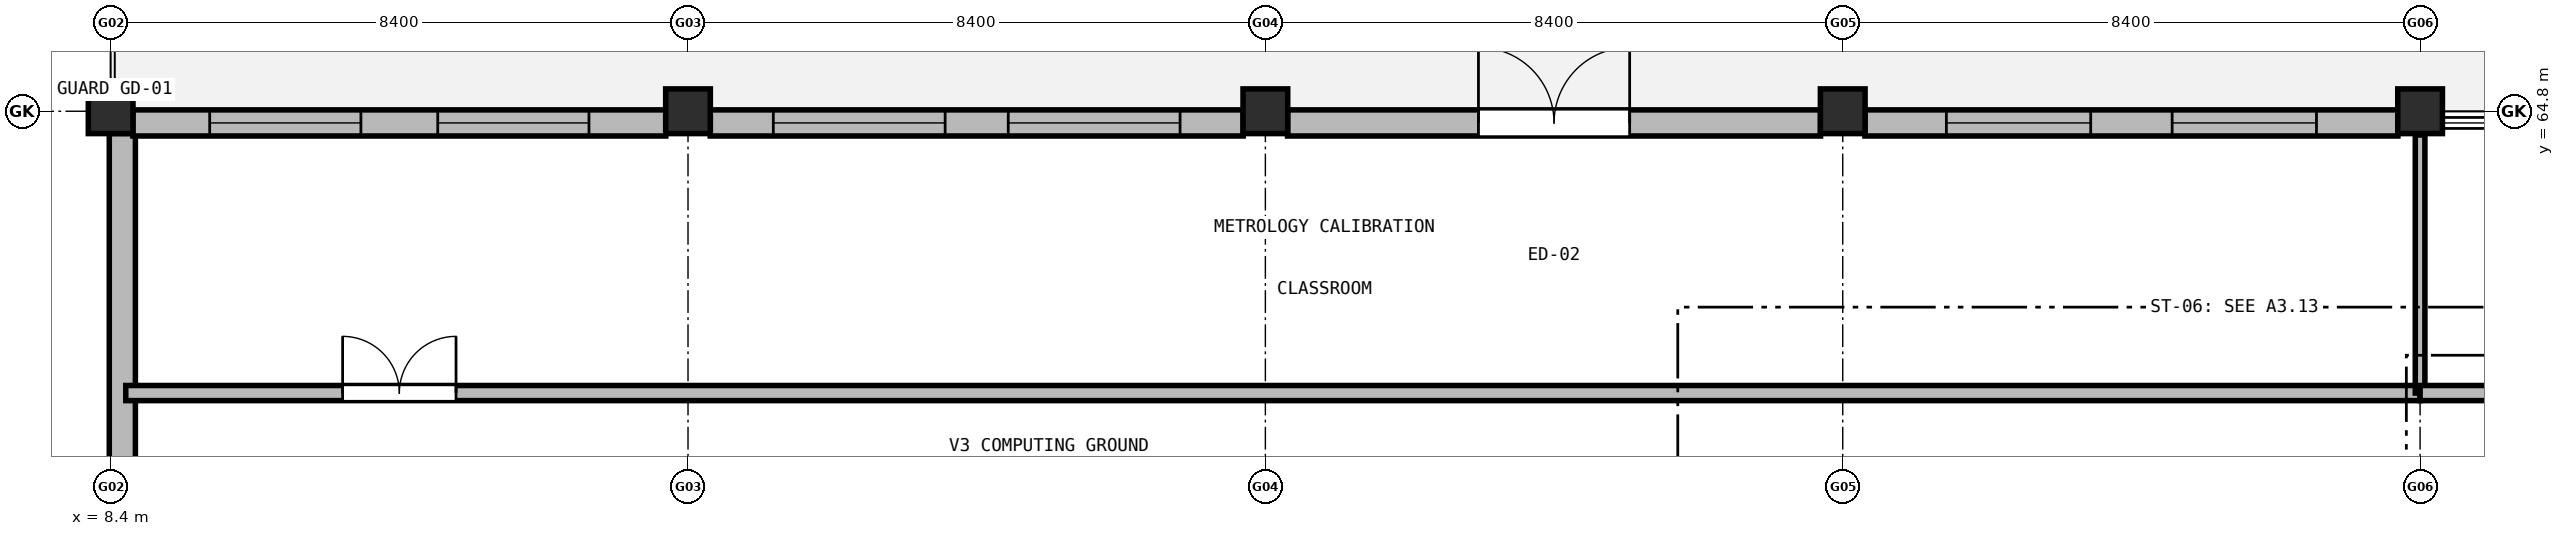
"""IFC4 building model, lengths in metres.
Left out: names, types, materials, properties, quantities, classifications, styles, units other than length and angle.
Written with IfcOpenShell. Run it as: python <this file> out.ifc"""

import sys

from ifc_helpers import new_model, si_unit, direction, frame, frame_2d, origin, origin_2d, place, context, subcontext, project, spatial, rectangle, extrude, element, fill, save


model = new_model("IFC4")
c1 = context("Model", 3, precision=1e-05, world=origin(), true_north=direction((0.0, 1.0)))
c2 = subcontext(c1, "Body", "Model", "MODEL_VIEW")
j1 = project(units=[si_unit("LENGTHUNIT", "METRE"), si_unit("PLANEANGLEUNIT", "RADIAN")], contexts=[c1])
p1 = place(None, origin())
s1 = spatial("IfcSite", under=j1, at=p1, CompositionType="ELEMENT")
p2 = place(p1, origin())
s2 = spatial("IfcBuilding", under=s1, at=p2, CompositionType="ELEMENT")
p3 = place(p2, origin())
s3 = spatial("IfcBuildingStorey", under=s2, at=p3, CompositionType="ELEMENT", Elevation=0.0)
for number, where, z_axis, x_axis in (
    (1, (8.4, 64.8, 0.0), (0.0, 0.0, 1.0), (1.0, 0.0, 0.0)),
    (2, (16.8, 64.8, 0.0), (0.0, 0.0, 1.0), (1.0, 0.0, 0.0)),
    (3, (25.2, 64.8, 0.0), (0.0, 0.0, 1.0), (1.0, 0.0, 0.0)),
    (4, (33.6, 64.8, 0.0), (0.0, 0.0, 1.0), (1.0, 0.0, 0.0)),
    (5, (42.0, 64.8, 0.0), (0.0, 0.0, 1.0), (1.0, 0.0, 0.0)),
):
    element("IfcColumn", number, at=place(p3, frame(where, z_axis=z_axis, x_axis=x_axis)), inside=s3, PredefinedType="COLUMN", context=c2, shape_type="SweptSolid", body=[
        extrude(rectangle(XDim=0.65, YDim=0.65, at=origin_2d()), origin(), (0.0, 0.0, 1.0), 5.1),
    ])
p4 = place(p3, frame((8.57, 57.923, 0.0), z_axis=(0.0, 0.0, 1.0), x_axis=(0.0, 1.0, 0.0)))
e6 = element("IfcWall", 6, at=p4, inside=s3, PredefinedType="SOLIDWALL", context=c2, shape_type="SweptSolid", body=[
    extrude(rectangle(XDim=6.554, YDim=0.38, at=frame_2d((3.277, 0.0))), origin(), (0.0, 0.0, 1.0), 4.11),
])
p5 = place(p3, frame((8.723, 64.63, 0.0), z_axis=(0.0, 0.0, 1.0), x_axis=(1.0, 0.0, 0.0)))
e7 = element("IfcWall", 7, at=p5, inside=s3, PredefinedType="SOLIDWALL", context=c2, shape_type="SweptSolid", body=[
    extrude(rectangle(XDim=7.754, YDim=0.38, at=frame_2d((3.877, 0.0))), origin(), (0.0, 0.0, 1.0), 4.01),
])
p6 = place(p5, frame((1.118, 0.0, 0.95)))
e8 = element("IfcOpeningElement", 8, at=p6, cuts=e7, PredefinedType="OPENING", context=c2, shape_type="SweptSolid", body=[
    extrude(rectangle(XDim=2.2, YDim=1.7, at=frame_2d((1.1, 0.85))), frame((0.0, 0.2, 0.0), z_axis=(0.0, -1.0, 0.0), x_axis=(1.0, 0.0, 0.0)), (0.0, 0.0, 1.0), 0.4),
])
p7 = place(p5, frame((4.436, 0.0, 0.95)))
e9 = element("IfcOpeningElement", 9, at=p7, cuts=e7, PredefinedType="OPENING", context=c2, shape_type="SweptSolid", body=[
    extrude(rectangle(XDim=2.2, YDim=1.7, at=frame_2d((1.1, 0.85))), frame((0.0, 0.2, 0.0), z_axis=(0.0, -1.0, 0.0), x_axis=(1.0, 0.0, 0.0)), (0.0, 0.0, 1.0), 0.4),
])
p8 = place(p3, frame((17.123, 64.63, 0.0), z_axis=(0.0, 0.0, 1.0), x_axis=(1.0, 0.0, 0.0)))
e10 = element("IfcWall", 10, at=p8, inside=s3, PredefinedType="SOLIDWALL", context=c2, shape_type="SweptSolid", body=[
    extrude(rectangle(XDim=7.754, YDim=0.38, at=frame_2d((3.877, 0.0))), origin(), (0.0, 0.0, 1.0), 4.01),
])
p9 = place(p8, frame((0.918, 0.0, 0.95)))
e11 = element("IfcOpeningElement", 11, at=p9, cuts=e10, PredefinedType="OPENING", context=c2, shape_type="SweptSolid", body=[
    extrude(rectangle(XDim=2.5, YDim=2.05, at=frame_2d((1.25, 1.025))), frame((0.0, 0.2, 0.0), z_axis=(0.0, -1.0, 0.0), x_axis=(1.0, 0.0, 0.0)), (0.0, 0.0, 1.0), 0.4),
])
p10 = place(p8, frame((4.336, 0.0, 0.95)))
e12 = element("IfcOpeningElement", 12, at=p10, cuts=e10, PredefinedType="OPENING", context=c2, shape_type="SweptSolid", body=[
    extrude(rectangle(XDim=2.5, YDim=2.05, at=frame_2d((1.25, 1.025))), frame((0.0, 0.2, 0.0), z_axis=(0.0, -1.0, 0.0), x_axis=(1.0, 0.0, 0.0)), (0.0, 0.0, 1.0), 0.4),
])
p11 = place(p3, frame((25.523, 64.63, 0.0), z_axis=(0.0, 0.0, 1.0), x_axis=(1.0, 0.0, 0.0)))
e13 = element("IfcWall", 13, at=p11, inside=s3, PredefinedType="SOLIDWALL", context=c2, shape_type="SweptSolid", body=[
    extrude(rectangle(XDim=7.754, YDim=0.38, at=frame_2d((3.877, 0.0))), origin(), (0.0, 0.0, 1.0), 4.01),
])
p12 = place(p11, frame((2.777, 0.0, 0.0)))
e14 = element("IfcOpeningElement", 14, at=p12, cuts=e13, PredefinedType="OPENING", context=c2, shape_type="SweptSolid", body=[
    extrude(rectangle(XDim=2.2, YDim=2.4, at=frame_2d((1.1, 1.2))), frame((0.0, 0.2, 0.0), z_axis=(0.0, -1.0, 0.0), x_axis=(1.0, 0.0, 0.0)), (0.0, 0.0, 1.0), 0.4),
])
p13 = place(p3, frame((33.923, 64.63, 0.0), z_axis=(0.0, 0.0, 1.0), x_axis=(1.0, 0.0, 0.0)))
e15 = element("IfcWall", 15, at=p13, inside=s3, PredefinedType="SOLIDWALL", context=c2, shape_type="SweptSolid", body=[
    extrude(rectangle(XDim=7.754, YDim=0.38, at=frame_2d((3.877, 0.0))), origin(), (0.0, 0.0, 1.0), 4.01),
])
p14 = place(p13, frame((1.185, 0.0, 0.95)))
e16 = element("IfcOpeningElement", 16, at=p14, cuts=e15, PredefinedType="OPENING", context=c2, shape_type="SweptSolid", body=[
    extrude(rectangle(XDim=2.1, YDim=1.85, at=frame_2d((1.05, 0.925))), frame((0.0, 0.2, 0.0), z_axis=(0.0, -1.0, 0.0), x_axis=(1.0, 0.0, 0.0)), (0.0, 0.0, 1.0), 0.4),
])
p15 = place(p13, frame((4.469, 0.0, 0.95)))
e17 = element("IfcOpeningElement", 17, at=p15, cuts=e15, PredefinedType="OPENING", context=c2, shape_type="SweptSolid", body=[
    extrude(rectangle(XDim=2.1, YDim=1.85, at=frame_2d((1.05, 0.925))), frame((0.0, 0.2, 0.0), z_axis=(0.0, -1.0, 0.0), x_axis=(1.0, 0.0, 0.0)), (0.0, 0.0, 1.0), 0.4),
])
p16 = place(p3, frame((8.62, 60.7, 0.0), z_axis=(0.0, 0.0, 1.0), x_axis=(1.0, 0.0, 0.0)))
e18 = element("IfcWall", 18, at=p16, inside=s3, PredefinedType="SOLIDWALL", context=c2, shape_type="SweptSolid", body=[
    extrude(rectangle(XDim=33.38, YDim=0.22, at=frame_2d((16.69, 0.0))), origin(), (0.0, 0.0, 1.0), 4.105),
])
p17 = place(p16, frame((3.155, 0.0, 0.0)))
e19 = element("IfcOpeningElement", 19, at=p17, cuts=e18, PredefinedType="OPENING", context=c2, shape_type="SweptSolid", body=[
    extrude(rectangle(XDim=1.65, YDim=2.2, at=frame_2d((0.825, 1.1))), frame((0.0, 0.12, 0.0), z_axis=(0.0, -1.0, 0.0), x_axis=(1.0, 0.0, 0.0)), (0.0, 0.0, 1.0), 0.24),
])
p18 = place(p3, frame((42.0, 60.7, 0.0), z_axis=(0.0, 0.0, 1.0), x_axis=(0.0, 1.0, 0.0)))
e20 = element("IfcWall", 20, at=p18, inside=s3, PredefinedType="PARTITIONING", context=c2, shape_type="SweptSolid", body=[
    extrude(rectangle(XDim=3.755, YDim=0.14, at=frame_2d((1.877, 0.0))), origin(), (0.0, 0.0, 1.0), 4.005),
])
p19 = place(p3, frame((42.0, 60.7, 0.0), z_axis=(0.0, 0.0, 1.0), x_axis=(1.0, 0.0, 0.0)))
e21 = element("IfcWall", 21, at=p19, inside=s3, PredefinedType="SOLIDWALL", context=c2, shape_type="SweptSolid", body=[
    extrude(rectangle(XDim=42.0, YDim=0.22, at=frame_2d((21.0, 0.0))), origin(), (0.0, 0.0, 1.0), 4.105),
])
p20 = place(p19, frame((3.55, 0.0, 0.0)))
e22 = element("IfcOpeningElement", 22, at=p20, cuts=e21, PredefinedType="OPENING", context=c2, shape_type="SweptSolid", body=[
    extrude(rectangle(XDim=1.3, YDim=2.15, at=frame_2d((0.65, 1.075))), frame((0.0, 0.12, 0.0), z_axis=(0.0, -1.0, 0.0), x_axis=(1.0, 0.0, 0.0)), (0.0, 0.0, 1.0), 0.24),
])
p21 = place(p6, origin())
e23 = element("IfcWindow", 23, at=p21, inside=s3, PartitioningType="SINGLE_PANEL", PredefinedType="WINDOW", context=c2, shape_type="SweptSolid", body=[
    extrude(rectangle(XDim=2.2, YDim=1.7, at=frame_2d((1.1, 0.85))), frame((0.0, 0.03, 0.0), z_axis=(0.0, -1.0, 0.0), x_axis=(1.0, 0.0, 0.0)), (0.0, 0.0, 1.0), 0.06),
])
fill(e8, e23)
p22 = place(p7, origin())
e24 = element("IfcWindow", 24, at=p22, inside=s3, PartitioningType="SINGLE_PANEL", PredefinedType="WINDOW", context=c2, shape_type="SweptSolid", body=[
    extrude(rectangle(XDim=2.2, YDim=1.7, at=frame_2d((1.1, 0.85))), frame((0.0, 0.03, 0.0), z_axis=(0.0, -1.0, 0.0), x_axis=(1.0, 0.0, 0.0)), (0.0, 0.0, 1.0), 0.06),
])
fill(e9, e24)
p23 = place(p9, origin())
e25 = element("IfcWindow", 25, at=p23, inside=s3, PartitioningType="SINGLE_PANEL", PredefinedType="WINDOW", context=c2, shape_type="SweptSolid", body=[
    extrude(rectangle(XDim=2.5, YDim=2.05, at=frame_2d((1.25, 1.025))), frame((0.0, 0.03, 0.0), z_axis=(0.0, -1.0, 0.0), x_axis=(1.0, 0.0, 0.0)), (0.0, 0.0, 1.0), 0.06),
])
fill(e11, e25)
p24 = place(p10, origin())
e26 = element("IfcWindow", 26, at=p24, inside=s3, PartitioningType="SINGLE_PANEL", PredefinedType="WINDOW", context=c2, shape_type="SweptSolid", body=[
    extrude(rectangle(XDim=2.5, YDim=2.05, at=frame_2d((1.25, 1.025))), frame((0.0, 0.03, 0.0), z_axis=(0.0, -1.0, 0.0), x_axis=(1.0, 0.0, 0.0)), (0.0, 0.0, 1.0), 0.06),
])
fill(e12, e26)
p25 = place(p12, origin())
e27 = element("IfcDoor", 27, at=p25, inside=s3, OperationType="DOUBLE_DOOR_SINGLE_SWING", PredefinedType="DOOR", context=c2, shape_type="SweptSolid", body=[
    extrude(rectangle(XDim=2.2, YDim=2.4, at=frame_2d((1.1, 1.2))), frame((0.0, 0.025, 0.0), z_axis=(0.0, -1.0, 0.0), x_axis=(1.0, 0.0, 0.0)), (0.0, 0.0, 1.0), 0.05),
])
fill(e14, e27)
p26 = place(p14, origin())
e28 = element("IfcWindow", 28, at=p26, inside=s3, PartitioningType="SINGLE_PANEL", PredefinedType="WINDOW", context=c2, shape_type="SweptSolid", body=[
    extrude(rectangle(XDim=2.1, YDim=1.85, at=frame_2d((1.05, 0.925))), frame((0.0, 0.03, 0.0), z_axis=(0.0, -1.0, 0.0), x_axis=(1.0, 0.0, 0.0)), (0.0, 0.0, 1.0), 0.06),
])
fill(e16, e28)
p27 = place(p15, origin())
e29 = element("IfcWindow", 29, at=p27, inside=s3, PartitioningType="SINGLE_PANEL", PredefinedType="WINDOW", context=c2, shape_type="SweptSolid", body=[
    extrude(rectangle(XDim=2.1, YDim=1.85, at=frame_2d((1.05, 0.925))), frame((0.0, 0.03, 0.0), z_axis=(0.0, -1.0, 0.0), x_axis=(1.0, 0.0, 0.0)), (0.0, 0.0, 1.0), 0.06),
])
fill(e17, e29)
p28 = place(p17, origin())
e30 = element("IfcDoor", 30, at=p28, inside=s3, OperationType="DOUBLE_DOOR_SINGLE_SWING", PredefinedType="DOOR", context=c2, shape_type="SweptSolid", body=[
    extrude(rectangle(XDim=1.65, YDim=2.2, at=frame_2d((0.825, 1.1))), frame((0.0, 0.025, 0.0), z_axis=(0.0, -1.0, 0.0), x_axis=(1.0, 0.0, 0.0)), (0.0, 0.0, 1.0), 0.05),
])
fill(e19, e30)
save(model, sys.argv[1])
